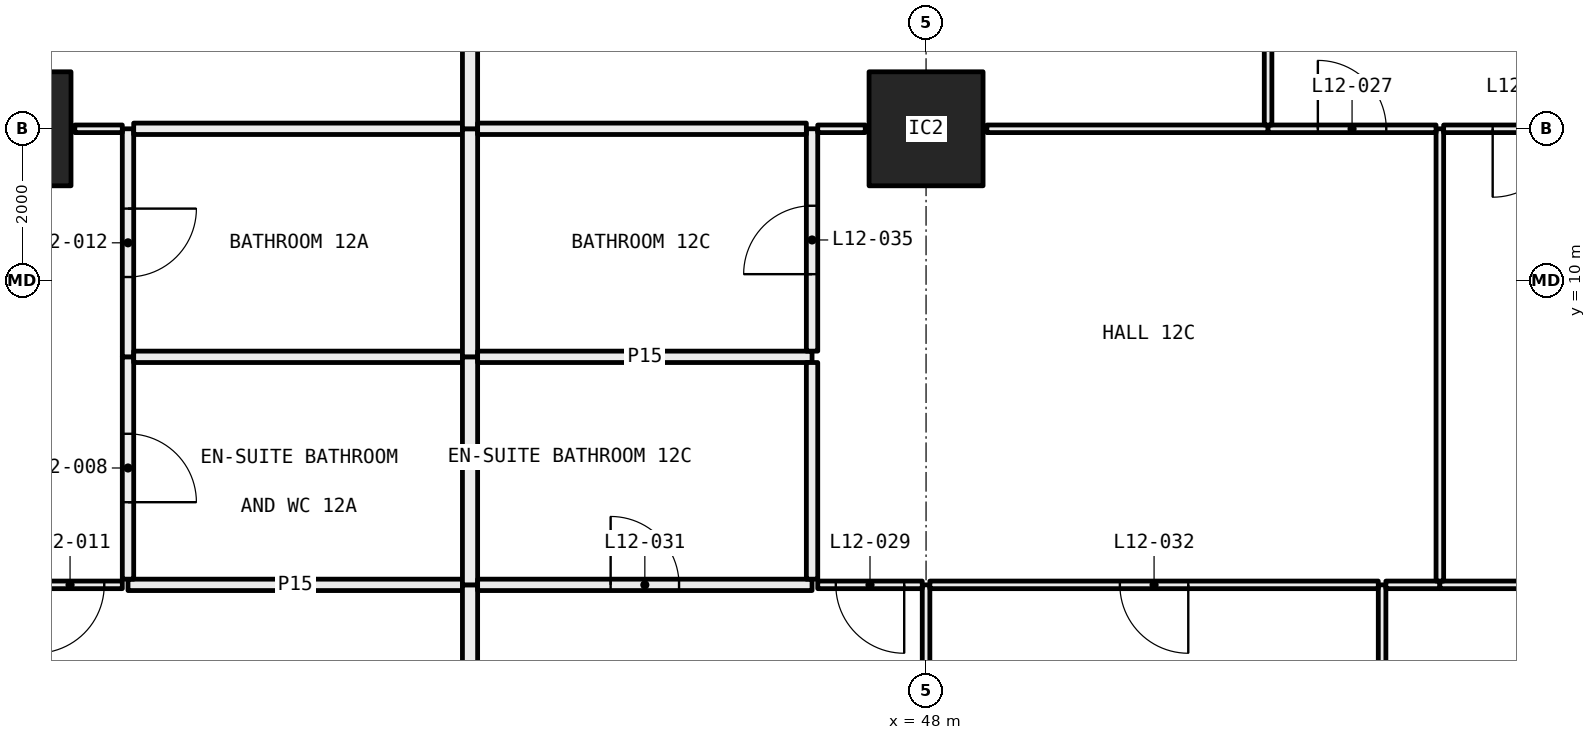
"""IFC4 building model, lengths in metres.
Left out: names, types, materials, properties, quantities, classifications, styles, units other than length and angle.
Written with IfcOpenShell. Run it as: python <this file> out.ifc"""

import sys

from ifc_helpers import new_model, si_unit, direction, frame, frame_2d, origin, origin_2d, place, context, subcontext, project, spatial, rectangle, hollow_rectangle, extrude, element, fill, save


model = new_model("IFC4")
c1 = context("Model", 3, precision=1e-05, world=origin(), true_north=direction((0.0, 1.0)))
c2 = subcontext(c1, "Body", "Model", "MODEL_VIEW")
j1 = project(units=[si_unit("LENGTHUNIT", "METRE"), si_unit("PLANEANGLEUNIT", "RADIAN")], contexts=[c1])
p1 = place(None, origin())
s1 = spatial("IfcSite", under=j1, at=p1, CompositionType="ELEMENT")
p2 = place(p1, origin())
s2 = spatial("IfcBuilding", under=s1, at=p2, CompositionType="ELEMENT")
p3 = place(p2, frame((0.0, 0.0, 54.15)))
s3 = spatial("IfcBuildingStorey", under=s2, at=p3, CompositionType="ELEMENT", Elevation=54.15)
for number, where, z_axis, x_axis in (
    (1, (36.0, 12.0, 0.0), (0.0, 0.0, 1.0), (1.0, 0.0, 0.0)),
    (2, (48.0, 12.0, 0.0), (0.0, 0.0, 1.0), (1.0, 0.0, 0.0)),
):
    element("IfcColumn", number, at=place(p3, frame(where, z_axis=z_axis, x_axis=x_axis)), inside=s3, PredefinedType="COLUMN", context=c2, shape_type="SweptSolid", body=[
        extrude(hollow_rectangle(XDim=1.5, YDim=1.5, WallThickness=0.065, at=origin_2d()), origin(), (0.0, 0.0, 1.0), 3.05),
    ])
p4 = place(p3, frame((37.425, 6.0, 0.0), z_axis=(0.0, 0.0, 1.0), x_axis=(-1.0, 0.0, 0.0)))
e3 = element("IfcWall", 3, at=p4, inside=s3, PredefinedType="PARTITIONING", context=c2, shape_type="SweptSolid", body=[
    extrude(rectangle(XDim=1.375, YDim=0.1, at=frame_2d((0.688, 0.0))), origin(), (0.0, 0.0, 1.0), 2.45),
])
p5 = place(p4, frame((0.238, 0.0, 0.0)))
e4 = element("IfcOpeningElement", 4, at=p5, cuts=e3, PredefinedType="OPENING", context=c2, shape_type="SweptSolid", body=[
    extrude(rectangle(XDim=0.9, YDim=2.1, at=frame_2d((0.45, 1.05))), frame((0.0, 0.06, 0.0), z_axis=(0.0, -1.0, 0.0), x_axis=(1.0, 0.0, 0.0)), (0.0, 0.0, 1.0), 0.12),
])
p6 = place(p3, frame((41.9, 6.0, 0.0), z_axis=(0.0, 0.0, 1.0), x_axis=(-1.0, 0.0, 0.0)))
e5 = element("IfcWall", 5, at=p6, inside=s3, PredefinedType="PARTITIONING", context=c2, shape_type="SweptSolid", body=[
    extrude(rectangle(XDim=4.4, YDim=0.15, at=frame_2d((2.2, 0.0))), origin(), (0.0, 0.0, 1.0), 3.05),
])
p7 = place(p3, frame((42.0, 0.72, 0.0), z_axis=(0.0, 0.0, 1.0), x_axis=(0.0, 1.0, 0.0)))
e6 = element("IfcWall", 6, at=p7, inside=s3, PredefinedType="PARTITIONING", context=c2, shape_type="SweptSolid", body=[
    extrude(rectangle(XDim=5.28, YDim=0.2, at=frame_2d((2.64, 0.0))), origin(), (0.0, 0.0, 1.0), 3.05),
])
p8 = place(p3, frame((37.5, 6.075, 0.0), z_axis=(0.0, 0.0, 1.0), x_axis=(0.0, 1.0, 0.0)))
e7 = element("IfcWall", 7, at=p8, inside=s3, PredefinedType="PARTITIONING", context=c2, shape_type="SweptSolid", body=[
    extrude(rectangle(XDim=2.925, YDim=0.15, at=frame_2d((1.462, 0.0))), origin(), (0.0, 0.0, 1.0), 3.05),
])
p9 = place(p8, frame((1.012, 0.0, 0.0)))
e8 = element("IfcOpeningElement", 8, at=p9, cuts=e7, PredefinedType="OPENING", context=c2, shape_type="SweptSolid", body=[
    extrude(rectangle(XDim=0.9, YDim=2.1, at=frame_2d((0.45, 1.05))), frame((0.0, 0.085, 0.0), z_axis=(0.0, -1.0, 0.0), x_axis=(1.0, 0.0, 0.0)), (0.0, 0.0, 1.0), 0.17),
])
p10 = place(p3, frame((37.5, 9.0, 0.0), z_axis=(0.0, 0.0, 1.0), x_axis=(0.0, 1.0, 0.0)))
e9 = element("IfcWall", 9, at=p10, inside=s3, PredefinedType="PARTITIONING", context=c2, shape_type="SweptSolid", body=[
    extrude(rectangle(XDim=3.0, YDim=0.15, at=frame_2d((1.5, 0.0))), origin(), (0.0, 0.0, 1.0), 2.45),
])
p11 = place(p10, frame((1.05, 0.0, 0.0)))
e10 = element("IfcOpeningElement", 10, at=p11, cuts=e9, PredefinedType="OPENING", context=c2, shape_type="SweptSolid", body=[
    extrude(rectangle(XDim=0.9, YDim=2.1, at=frame_2d((0.45, 1.05))), frame((0.0, 0.085, 0.0), z_axis=(0.0, -1.0, 0.0), x_axis=(1.0, 0.0, 0.0)), (0.0, 0.0, 1.0), 0.17),
])
p12 = place(p3, frame((37.425, 12.0, 0.0), z_axis=(0.0, 0.0, 1.0), x_axis=(-1.0, 0.0, 0.0)))
e11 = element("IfcWall", 11, at=p12, inside=s3, PredefinedType="PARTITIONING", context=c2, shape_type="SweptSolid", body=[
    extrude(rectangle(XDim=0.625, YDim=0.1, at=frame_2d((0.312, 0.0))), origin(), (0.0, 0.0, 1.0), 2.45),
])
p13 = place(p3, frame((41.9, 9.0, 0.0), z_axis=(0.0, 0.0, 1.0), x_axis=(-1.0, 0.0, 0.0)))
e12 = element("IfcWall", 12, at=p13, inside=s3, PredefinedType="PARTITIONING", context=c2, shape_type="SweptSolid", body=[
    extrude(rectangle(XDim=4.325, YDim=0.15, at=frame_2d((2.163, 0.0))), origin(), (0.0, 0.0, 1.0), 3.05),
])
p14 = place(p3, frame((42.0, 6.0, 0.0), z_axis=(0.0, 0.0, 1.0), x_axis=(0.0, 1.0, 0.0)))
e13 = element("IfcWall", 13, at=p14, inside=s3, PredefinedType="PARTITIONING", context=c2, shape_type="SweptSolid", body=[
    extrude(rectangle(XDim=3.0, YDim=0.2, at=frame_2d((1.5, 0.0))), origin(), (0.0, 0.0, 1.0), 3.05),
])
p15 = place(p3, frame((41.9, 12.0, 0.0), z_axis=(0.0, 0.0, 1.0), x_axis=(-1.0, 0.0, 0.0)))
e14 = element("IfcWall", 14, at=p15, inside=s3, PredefinedType="PARTITIONING", context=c2, shape_type="SweptSolid", body=[
    extrude(rectangle(XDim=4.325, YDim=0.15, at=frame_2d((2.163, 0.0))), origin(), (0.0, 0.0, 1.0), 2.45),
])
p16 = place(p3, frame((42.0, 9.0, 0.0), z_axis=(0.0, 0.0, 1.0), x_axis=(0.0, 1.0, 0.0)))
e15 = element("IfcWall", 15, at=p16, inside=s3, PredefinedType="PARTITIONING", context=c2, shape_type="SweptSolid", body=[
    extrude(rectangle(XDim=3.0, YDim=0.2, at=frame_2d((1.5, 0.0))), origin(), (0.0, 0.0, 1.0), 2.45),
])
p17 = place(p3, frame((42.0, 12.0, 0.0), z_axis=(0.0, 0.0, 1.0), x_axis=(0.0, 1.0, 0.0)))
e16 = element("IfcWall", 16, at=p17, inside=s3, PredefinedType="PARTITIONING", context=c2, shape_type="SweptSolid", body=[
    extrude(rectangle(XDim=5.9, YDim=0.2, at=frame_2d((2.95, 0.0))), origin(), (0.0, 0.0, 1.0), 2.45),
])
p18 = place(p3, frame((48.0, 0.72, 0.0), z_axis=(0.0, 0.0, 1.0), x_axis=(0.0, 1.0, 0.0)))
e17 = element("IfcWall", 17, at=p18, inside=s3, PredefinedType="PARTITIONING", context=c2, shape_type="SweptSolid", body=[
    extrude(rectangle(XDim=5.28, YDim=0.1, at=frame_2d((2.64, 0.0))), origin(), (0.0, 0.0, 1.0), 2.45),
])
p19 = place(p3, frame((46.5, 6.0, 0.0), z_axis=(0.0, 0.0, 1.0), x_axis=(-1.0, 0.0, 0.0)))
e18 = element("IfcWall", 18, at=p19, inside=s3, PredefinedType="PARTITIONING", context=c2, shape_type="SweptSolid", body=[
    extrude(rectangle(XDim=4.4, YDim=0.15, at=frame_2d((2.2, 0.0))), origin(), (0.0, 0.0, 1.0), 3.05),
])
p20 = place(p19, frame((1.75, 0.0, 0.0)))
e19 = element("IfcOpeningElement", 19, at=p20, cuts=e18, PredefinedType="OPENING", context=c2, shape_type="SweptSolid", body=[
    extrude(rectangle(XDim=0.9, YDim=2.1, at=frame_2d((0.45, 1.05))), frame((0.0, 0.085, 0.0), z_axis=(0.0, -1.0, 0.0), x_axis=(1.0, 0.0, 0.0)), (0.0, 0.0, 1.0), 0.17),
])
p21 = place(p3, frame((47.95, 6.0, 0.0), z_axis=(0.0, 0.0, 1.0), x_axis=(-1.0, 0.0, 0.0)))
e20 = element("IfcWall", 20, at=p21, inside=s3, PredefinedType="PARTITIONING", context=c2, shape_type="SweptSolid", body=[
    extrude(rectangle(XDim=1.375, YDim=0.1, at=frame_2d((0.688, 0.0))), origin(), (0.0, 0.0, 1.0), 2.45),
])
p22 = place(p21, frame((0.238, 0.0, 0.0)))
e21 = element("IfcOpeningElement", 21, at=p22, cuts=e20, PredefinedType="OPENING", context=c2, shape_type="SweptSolid", body=[
    extrude(rectangle(XDim=0.9, YDim=2.1, at=frame_2d((0.45, 1.05))), frame((0.0, 0.06, 0.0), z_axis=(0.0, -1.0, 0.0), x_axis=(1.0, 0.0, 0.0)), (0.0, 0.0, 1.0), 0.12),
])
p23 = place(p3, frame((54.0, 0.72, 0.0), z_axis=(0.0, 0.0, 1.0), x_axis=(0.0, 1.0, 0.0)))
e22 = element("IfcWall", 22, at=p23, inside=s3, PredefinedType="PARTITIONING", context=c2, shape_type="SweptSolid", body=[
    extrude(rectangle(XDim=5.28, YDim=0.1, at=frame_2d((2.64, 0.0))), origin(), (0.0, 0.0, 1.0), 3.05),
])
p24 = place(p3, frame((53.95, 6.0, 0.0), z_axis=(0.0, 0.0, 1.0), x_axis=(-1.0, 0.0, 0.0)))
e23 = element("IfcWall", 23, at=p24, inside=s3, PredefinedType="PARTITIONING", context=c2, shape_type="SweptSolid", body=[
    extrude(rectangle(XDim=5.9, YDim=0.1, at=frame_2d((2.95, 0.0))), origin(), (0.0, 0.0, 1.0), 2.45),
])
p25 = place(p24, frame((2.5, 0.0, 0.0)))
e24 = element("IfcOpeningElement", 24, at=p25, cuts=e23, PredefinedType="OPENING", context=c2, shape_type="SweptSolid", body=[
    extrude(rectangle(XDim=0.9, YDim=2.1, at=frame_2d((0.45, 1.05))), frame((0.0, 0.06, 0.0), z_axis=(0.0, -1.0, 0.0), x_axis=(1.0, 0.0, 0.0)), (0.0, 0.0, 1.0), 0.12),
])
p26 = place(p3, frame((54.76, 6.0, 0.0), z_axis=(0.0, 0.0, 1.0), x_axis=(-1.0, 0.0, 0.0)))
e25 = element("IfcWall", 25, at=p26, inside=s3, PredefinedType="PARTITIONING", context=c2, shape_type="SweptSolid", body=[
    extrude(rectangle(XDim=0.71, YDim=0.1, at=frame_2d((0.355, 0.0))), origin(), (0.0, 0.0, 1.0), 3.05),
])
p27 = place(p3, frame((59.95, 6.0, 0.0), z_axis=(0.0, 0.0, 1.0), x_axis=(-1.0, 0.0, 0.0)))
e26 = element("IfcWall", 26, at=p27, inside=s3, PredefinedType="PARTITIONING", context=c2, shape_type="SweptSolid", body=[
    extrude(rectangle(XDim=5.19, YDim=0.1, at=frame_2d((2.595, 0.0))), origin(), (0.0, 0.0, 1.0), 2.45),
])
p28 = place(p27, frame((2.145, 0.0, 0.0)))
e27 = element("IfcOpeningElement", 27, at=p28, cuts=e26, PredefinedType="OPENING", context=c2, shape_type="SweptSolid", body=[
    extrude(rectangle(XDim=0.9, YDim=2.1, at=frame_2d((0.45, 1.05))), frame((0.0, 0.06, 0.0), z_axis=(0.0, -1.0, 0.0), x_axis=(1.0, 0.0, 0.0)), (0.0, 0.0, 1.0), 0.12),
])
p29 = place(p3, frame((46.5, 9.0, 0.0), z_axis=(0.0, 0.0, 1.0), x_axis=(-1.0, 0.0, 0.0)))
e28 = element("IfcWall", 28, at=p29, inside=s3, PredefinedType="PARTITIONING", context=c2, shape_type="SweptSolid", body=[
    extrude(rectangle(XDim=4.4, YDim=0.15, at=frame_2d((2.2, 0.0))), origin(), (0.0, 0.0, 1.0), 3.05),
])
p30 = place(p3, frame((46.5, 6.075, 0.0), z_axis=(0.0, 0.0, 1.0), x_axis=(0.0, 1.0, 0.0)))
e29 = element("IfcWall", 29, at=p30, inside=s3, PredefinedType="PARTITIONING", context=c2, shape_type="SweptSolid", body=[
    extrude(rectangle(XDim=2.85, YDim=0.15, at=frame_2d((1.425, 0.0))), origin(), (0.0, 0.0, 1.0), 3.05),
])
p31 = place(p3, frame((46.5, 9.075, 0.0), z_axis=(0.0, 0.0, 1.0), x_axis=(0.0, 1.0, 0.0)))
e30 = element("IfcWall", 30, at=p31, inside=s3, PredefinedType="PARTITIONING", context=c2, shape_type="SweptSolid", body=[
    extrude(rectangle(XDim=2.925, YDim=0.15, at=frame_2d((1.462, 0.0))), origin(), (0.0, 0.0, 1.0), 2.45),
])
p32 = place(p31, frame((1.012, 0.0, 0.0)))
e31 = element("IfcOpeningElement", 31, at=p32, cuts=e30, PredefinedType="OPENING", context=c2, shape_type="SweptSolid", body=[
    extrude(rectangle(XDim=0.9, YDim=2.1, at=frame_2d((0.45, 1.05))), frame((0.0, 0.085, 0.0), z_axis=(0.0, -1.0, 0.0), x_axis=(1.0, 0.0, 0.0)), (0.0, 0.0, 1.0), 0.17),
])
p33 = place(p3, frame((46.425, 12.0, 0.0), z_axis=(0.0, 0.0, 1.0), x_axis=(-1.0, 0.0, 0.0)))
e32 = element("IfcWall", 32, at=p33, inside=s3, PredefinedType="PARTITIONING", context=c2, shape_type="SweptSolid", body=[
    extrude(rectangle(XDim=4.325, YDim=0.15, at=frame_2d((2.163, 0.0))), origin(), (0.0, 0.0, 1.0), 2.45),
])
p34 = place(p3, frame((54.76, 6.05, 0.0), z_axis=(0.0, 0.0, 1.0), x_axis=(0.0, 1.0, 0.0)))
e33 = element("IfcWall", 33, at=p34, inside=s3, PredefinedType="PARTITIONING", context=c2, shape_type="SweptSolid", body=[
    extrude(rectangle(XDim=5.95, YDim=0.1, at=frame_2d((2.975, 0.0))), origin(), (0.0, 0.0, 1.0), 2.45),
])
p35 = place(p3, frame((47.2, 12.0, 0.0), z_axis=(0.0, 0.0, 1.0), x_axis=(-1.0, 0.0, 0.0)))
e34 = element("IfcWall", 34, at=p35, inside=s3, PredefinedType="PARTITIONING", context=c2, shape_type="SweptSolid", body=[
    extrude(rectangle(XDim=0.625, YDim=0.1, at=frame_2d((0.312, 0.0))), origin(), (0.0, 0.0, 1.0), 2.45),
])
p36 = place(p3, frame((52.5, 12.0, 0.0), z_axis=(0.0, 0.0, 1.0), x_axis=(-1.0, 0.0, 0.0)))
e35 = element("IfcWall", 35, at=p36, inside=s3, PredefinedType="PARTITIONING", context=c2, shape_type="SweptSolid", body=[
    extrude(rectangle(XDim=3.7, YDim=0.1, at=frame_2d((1.85, 0.0))), origin(), (0.0, 0.0, 1.0), 2.45),
])
p37 = place(p3, frame((54.71, 12.0, 0.0), z_axis=(0.0, 0.0, 1.0), x_axis=(-1.0, 0.0, 0.0)))
e36 = element("IfcWall", 36, at=p37, inside=s3, PredefinedType="PARTITIONING", context=c2, shape_type="SweptSolid", body=[
    extrude(rectangle(XDim=2.21, YDim=0.1, at=frame_2d((1.105, 0.0))), origin(), (0.0, 0.0, 1.0), 2.45),
])
p38 = place(p37, frame((0.655, 0.0, 0.0)))
e37 = element("IfcOpeningElement", 37, at=p38, cuts=e36, PredefinedType="OPENING", context=c2, shape_type="SweptSolid", body=[
    extrude(rectangle(XDim=0.9, YDim=2.1, at=frame_2d((0.45, 1.05))), frame((0.0, 0.06, 0.0), z_axis=(0.0, -1.0, 0.0), x_axis=(1.0, 0.0, 0.0)), (0.0, 0.0, 1.0), 0.12),
])
p39 = place(p3, frame((57.0, 12.0, 0.0), z_axis=(0.0, 0.0, 1.0), x_axis=(-1.0, 0.0, 0.0)))
e38 = element("IfcWall", 38, at=p39, inside=s3, PredefinedType="PARTITIONING", context=c2, shape_type="SweptSolid", body=[
    extrude(rectangle(XDim=2.19, YDim=0.1, at=frame_2d((1.095, 0.0))), origin(), (0.0, 0.0, 1.0), 2.45),
])
p40 = place(p39, frame((0.645, 0.0, 0.0)))
e39 = element("IfcOpeningElement", 39, at=p40, cuts=e38, PredefinedType="OPENING", context=c2, shape_type="SweptSolid", body=[
    extrude(rectangle(XDim=0.9, YDim=2.1, at=frame_2d((0.45, 1.05))), frame((0.0, 0.06, 0.0), z_axis=(0.0, -1.0, 0.0), x_axis=(1.0, 0.0, 0.0)), (0.0, 0.0, 1.0), 0.12),
])
p41 = place(p3, frame((52.5, 12.05, 0.0), z_axis=(0.0, 0.0, 1.0), x_axis=(0.0, 1.0, 0.0)))
e40 = element("IfcWall", 40, at=p41, inside=s3, PredefinedType="PARTITIONING", context=c2, shape_type="SweptSolid", body=[
    extrude(rectangle(XDim=5.85, YDim=0.1, at=frame_2d((2.925, 0.0))), origin(), (0.0, 0.0, 1.0), 2.45),
])
p42 = place(p41, frame((2.475, 0.0, 0.0)))
e41 = element("IfcOpeningElement", 41, at=p42, cuts=e40, PredefinedType="OPENING", context=c2, shape_type="SweptSolid", body=[
    extrude(rectangle(XDim=0.9, YDim=2.1, at=frame_2d((0.45, 1.05))), frame((0.0, 0.06, 0.0), z_axis=(0.0, -1.0, 0.0), x_axis=(1.0, 0.0, 0.0)), (0.0, 0.0, 1.0), 0.12),
])
p43 = place(p9, frame((0.9, 0.0, 0.0), x_axis=(-1.0, 0.0, 0.0)))
e42 = element("IfcDoor", 42, at=p43, inside=s3, OperationType="SINGLE_SWING_LEFT", PredefinedType="DOOR", context=c2, shape_type="SweptSolid", body=[
    extrude(rectangle(XDim=0.9, YDim=2.1, at=frame_2d((0.45, 1.05))), frame((0.0, 0.025, 0.0), z_axis=(0.0, -1.0, 0.0), x_axis=(1.0, 0.0, 0.0)), (0.0, 0.0, 1.0), 0.05),
])
fill(e8, e42)
p44 = place(p5, origin())
e43 = element("IfcDoor", 43, at=p44, inside=s3, OperationType="SINGLE_SWING_LEFT", PredefinedType="DOOR", context=c2, shape_type="SweptSolid", body=[
    extrude(rectangle(XDim=0.9, YDim=2.1, at=frame_2d((0.45, 1.05))), frame((0.0, 0.025, 0.0), z_axis=(0.0, -1.0, 0.0), x_axis=(1.0, 0.0, 0.0)), (0.0, 0.0, 1.0), 0.05),
])
fill(e4, e43)
p45 = place(p11, frame((0.9, 0.0, 0.0), x_axis=(-1.0, 0.0, 0.0)))
e44 = element("IfcDoor", 44, at=p45, inside=s3, OperationType="SINGLE_SWING_RIGHT", PredefinedType="DOOR", context=c2, shape_type="SweptSolid", body=[
    extrude(rectangle(XDim=0.9, YDim=2.1, at=frame_2d((0.45, 1.05))), frame((0.0, 0.025, 0.0), z_axis=(0.0, -1.0, 0.0), x_axis=(1.0, 0.0, 0.0)), (0.0, 0.0, 1.0), 0.05),
])
fill(e10, e44)
p46 = place(p38, frame((0.9, 0.0, 0.0), x_axis=(-1.0, 0.0, 0.0)))
e45 = element("IfcDoor", 45, at=p46, inside=s3, OperationType="SINGLE_SWING_RIGHT", PredefinedType="DOOR", context=c2, shape_type="SweptSolid", body=[
    extrude(rectangle(XDim=0.9, YDim=2.1, at=frame_2d((0.45, 1.05))), frame((0.0, 0.025, 0.0), z_axis=(0.0, -1.0, 0.0), x_axis=(1.0, 0.0, 0.0)), (0.0, 0.0, 1.0), 0.05),
])
fill(e37, e45)
p47 = place(p40, origin())
e46 = element("IfcDoor", 46, at=p47, inside=s3, OperationType="SINGLE_SWING_LEFT", PredefinedType="DOOR", context=c2, shape_type="SweptSolid", body=[
    extrude(rectangle(XDim=0.9, YDim=2.1, at=frame_2d((0.45, 1.05))), frame((0.0, 0.025, 0.0), z_axis=(0.0, -1.0, 0.0), x_axis=(1.0, 0.0, 0.0)), (0.0, 0.0, 1.0), 0.05),
])
fill(e39, e46)
p48 = place(p22, origin())
e47 = element("IfcDoor", 47, at=p48, inside=s3, OperationType="SINGLE_SWING_RIGHT", PredefinedType="DOOR", context=c2, shape_type="SweptSolid", body=[
    extrude(rectangle(XDim=0.9, YDim=2.1, at=frame_2d((0.45, 1.05))), frame((0.0, 0.025, 0.0), z_axis=(0.0, -1.0, 0.0), x_axis=(1.0, 0.0, 0.0)), (0.0, 0.0, 1.0), 0.05),
])
fill(e21, e47)
p49 = place(p20, frame((0.9, 0.0, 0.0), x_axis=(-1.0, 0.0, 0.0)))
e48 = element("IfcDoor", 48, at=p49, inside=s3, OperationType="SINGLE_SWING_RIGHT", PredefinedType="DOOR", context=c2, shape_type="SweptSolid", body=[
    extrude(rectangle(XDim=0.9, YDim=2.1, at=frame_2d((0.45, 1.05))), frame((0.0, 0.025, 0.0), z_axis=(0.0, -1.0, 0.0), x_axis=(1.0, 0.0, 0.0)), (0.0, 0.0, 1.0), 0.05),
])
fill(e19, e48)
p50 = place(p25, origin())
e49 = element("IfcDoor", 49, at=p50, inside=s3, OperationType="SINGLE_SWING_RIGHT", PredefinedType="DOOR", context=c2, shape_type="SweptSolid", body=[
    extrude(rectangle(XDim=0.9, YDim=2.1, at=frame_2d((0.45, 1.05))), frame((0.0, 0.025, 0.0), z_axis=(0.0, -1.0, 0.0), x_axis=(1.0, 0.0, 0.0)), (0.0, 0.0, 1.0), 0.05),
])
fill(e24, e49)
p51 = place(p32, origin())
e50 = element("IfcDoor", 50, at=p51, inside=s3, OperationType="SINGLE_SWING_RIGHT", PredefinedType="DOOR", context=c2, shape_type="SweptSolid", body=[
    extrude(rectangle(XDim=0.9, YDim=2.1, at=frame_2d((0.45, 1.05))), frame((0.0, 0.025, 0.0), z_axis=(0.0, -1.0, 0.0), x_axis=(1.0, 0.0, 0.0)), (0.0, 0.0, 1.0), 0.05),
])
fill(e31, e50)
save(model, sys.argv[1])
